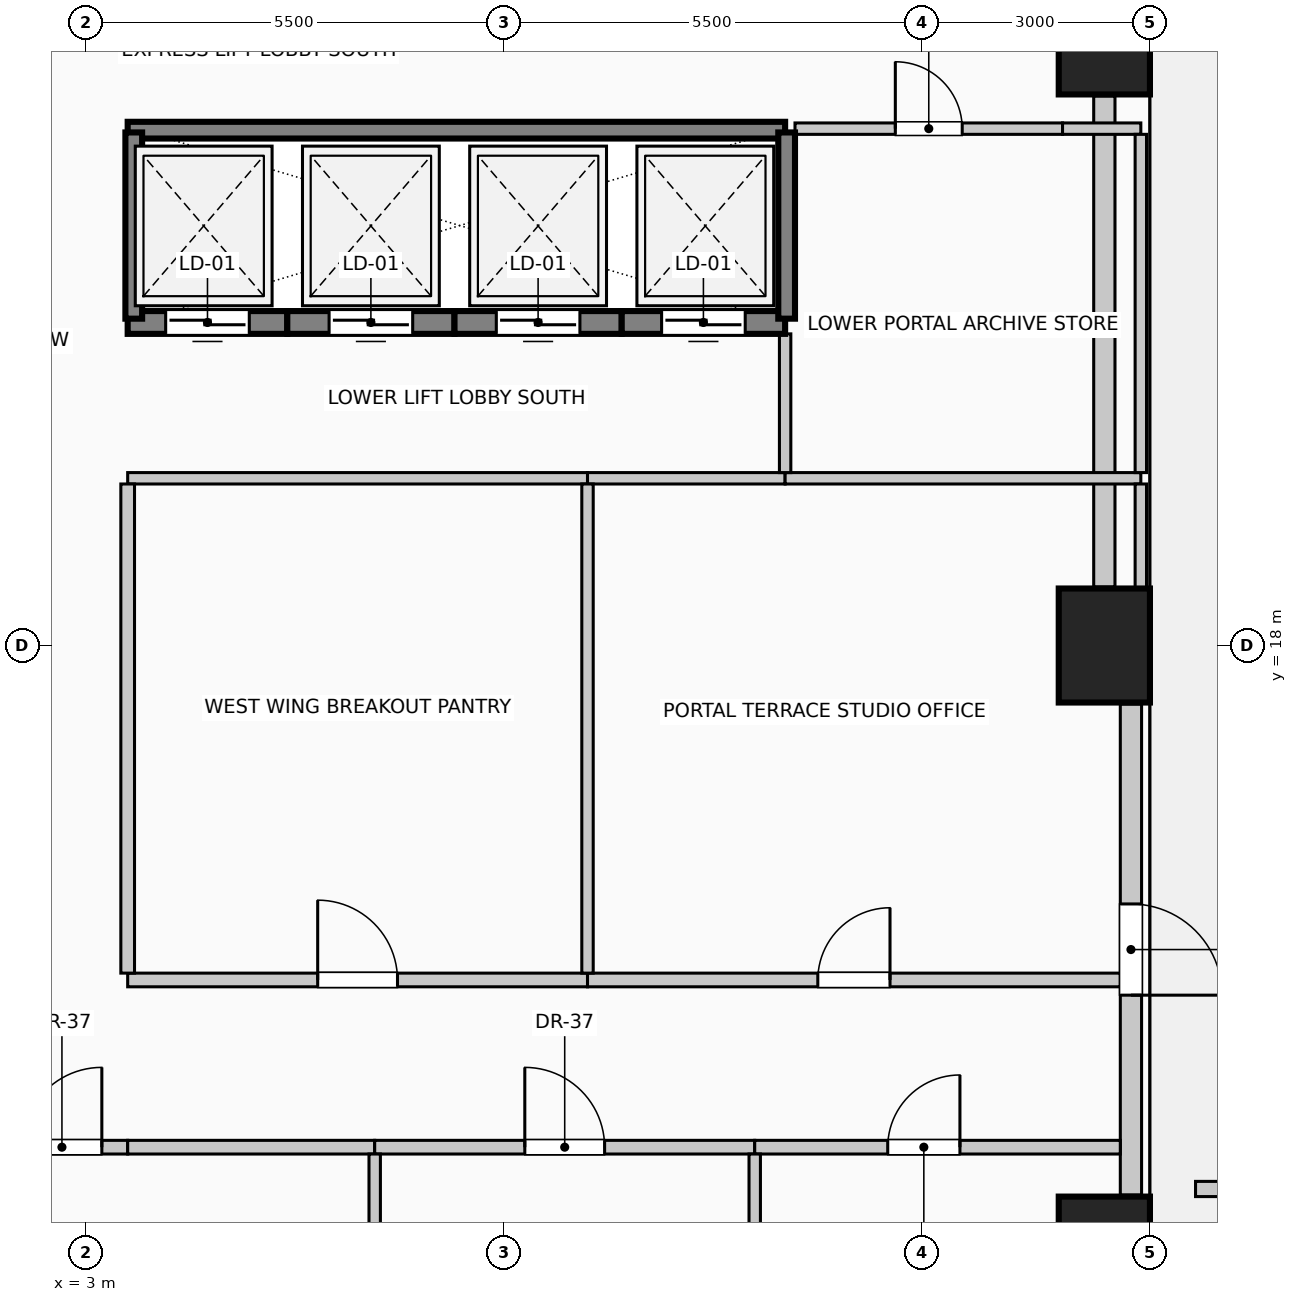
"""IFC4 building model, lengths in metres.
Left out: names, types, materials, properties, quantities, classifications, styles, units other than length and angle.
Written with IfcOpenShell. Run it as: python <this file> out.ifc"""

import sys

from ifc_helpers import new_model, si_unit, direction, frame, frame_2d, origin, origin_2d, place, context, subcontext, project, spatial, rectangle, extrude, element, fill, save


model = new_model("IFC4")
c1 = context("Model", 3, precision=1e-05, world=origin(), true_north=direction((0.0, 1.0)))
c2 = subcontext(c1, "Body", "Model", "MODEL_VIEW")
j1 = project(units=[si_unit("LENGTHUNIT", "METRE"), si_unit("PLANEANGLEUNIT", "RADIAN")], contexts=[c1])
p1 = place(None, origin())
s1 = spatial("IfcSite", under=j1, at=p1, CompositionType="ELEMENT")
p2 = place(p1, origin())
s2 = spatial("IfcBuilding", under=s1, at=p2, CompositionType="ELEMENT")
p3 = place(p2, frame((0.0, 0.0, 30.6)))
s3 = spatial("IfcBuildingStorey", under=s2, at=p3, CompositionType="ELEMENT", Elevation=30.6)
for number, where, z_axis, x_axis in (
    (1, (16.4, 10.0, 0.0), (0.0, 0.0, 1.0), (1.0, 0.0, 0.0)),
    (2, (16.4, 18.0, 0.0), (0.0, 0.0, 1.0), (1.0, 0.0, 0.0)),
    (3, (16.4, 26.0, 0.0), (0.0, 0.0, 1.0), (1.0, 0.0, 0.0)),
):
    element("IfcColumn", number, at=place(p3, frame(where, z_axis=z_axis, x_axis=x_axis)), inside=s3, PredefinedType="COLUMN", context=c2, shape_type="SweptSolid", body=[
        extrude(rectangle(XDim=1.2, YDim=1.5, at=origin_2d()), origin(), (0.0, 0.0, 1.0), 4.0),
    ])
p4 = place(p3, frame((16.75, 17.23, 0.0), z_axis=(0.0, 0.0, 1.0), x_axis=(0.0, -1.0, 0.0)))
e4 = element("IfcWall", 4, at=p4, inside=s3, PredefinedType="SOLIDWALL", context=c2, shape_type="SweptSolid", body=[
    extrude(rectangle(XDim=6.46, YDim=0.28, at=frame_2d((3.23, 0.0))), origin(), (0.0, 0.0, 1.0), 3.7),
])
p5 = place(p4, frame((2.63, 0.0, 0.0)))
e5 = element("IfcOpeningElement", 5, at=p5, cuts=e4, PredefinedType="OPENING", context=c2, shape_type="SweptSolid", body=[
    extrude(rectangle(XDim=1.2, YDim=2.25, at=frame_2d((0.6, 1.125))), frame((0.0, 0.15, 0.0), z_axis=(0.0, -1.0, 0.0), x_axis=(1.0, 0.0, 0.0)), (0.0, 0.0, 1.0), 0.3),
])
p6 = place(p3, frame((16.4, 25.23, 0.0), z_axis=(0.0, 0.0, 1.0), x_axis=(0.0, -1.0, 0.0)))
e6 = element("IfcWall", 6, at=p6, inside=s3, PredefinedType="SOLIDWALL", context=c2, shape_type="SweptSolid", body=[
    extrude(rectangle(XDim=6.46, YDim=0.28, at=frame_2d((3.23, 0.0))), origin(), (0.0, 0.0, 1.0), 3.0),
])
p7 = place(p3, frame((17.6, 10.85, 0.0), z_axis=(0.0, 0.0, 1.0), x_axis=(1.0, 0.0, 0.0)))
e7 = element("IfcWall", 7, at=p7, inside=s3, PredefinedType="USERDEFINED", context=c2, shape_type="SweptSolid", body=[
    extrude(rectangle(XDim=22.8, YDim=0.2, at=frame_2d((11.4, 0.0))), origin(), (0.0, 0.0, 1.0), 0.55),
])
p8 = place(p3, frame((5.65, 22.25, 0.0), z_axis=(0.0, 0.0, 1.0), x_axis=(-1.0, 0.0, 0.0)))
e8 = element("IfcWall", 8, at=p8, inside=s3, PredefinedType="SOLIDWALL", context=c2, shape_type="SweptSolid", body=[
    extrude(rectangle(XDim=2.1, YDim=0.3, at=frame_2d((1.05, 0.0))), origin(), (0.0, 0.0, 1.0), 4.0),
])
p9 = place(p8, frame((0.5, 0.0, 0.0)))
e9 = element("IfcOpeningElement", 9, at=p9, cuts=e8, PredefinedType="OPENING", context=c2, shape_type="SweptSolid", body=[
    extrude(rectangle(XDim=1.1, YDim=2.2, at=frame_2d((0.55, 1.1))), frame((0.0, 0.16, 0.0), z_axis=(0.0, -1.0, 0.0), x_axis=(1.0, 0.0, 0.0)), (0.0, 0.0, 1.0), 0.32),
])
p10 = place(p3, frame((7.85, 22.25, 0.0), z_axis=(0.0, 0.0, 1.0), x_axis=(-1.0, 0.0, 0.0)))
e10 = element("IfcWall", 10, at=p10, inside=s3, PredefinedType="SOLIDWALL", context=c2, shape_type="SweptSolid", body=[
    extrude(rectangle(XDim=2.2, YDim=0.3, at=frame_2d((1.1, 0.0))), origin(), (0.0, 0.0, 1.0), 4.0),
])
p11 = place(p10, frame((0.55, 0.0, 0.0)))
e11 = element("IfcOpeningElement", 11, at=p11, cuts=e10, PredefinedType="OPENING", context=c2, shape_type="SweptSolid", body=[
    extrude(rectangle(XDim=1.1, YDim=2.2, at=frame_2d((0.55, 1.1))), frame((0.0, 0.16, 0.0), z_axis=(0.0, -1.0, 0.0), x_axis=(1.0, 0.0, 0.0)), (0.0, 0.0, 1.0), 0.32),
])
p12 = place(p3, frame((10.05, 22.25, 0.0), z_axis=(0.0, 0.0, 1.0), x_axis=(-1.0, 0.0, 0.0)))
e12 = element("IfcWall", 12, at=p12, inside=s3, PredefinedType="SOLIDWALL", context=c2, shape_type="SweptSolid", body=[
    extrude(rectangle(XDim=2.2, YDim=0.3, at=frame_2d((1.1, 0.0))), origin(), (0.0, 0.0, 1.0), 4.0),
])
p13 = place(p12, frame((0.55, 0.0, 0.0)))
e13 = element("IfcOpeningElement", 13, at=p13, cuts=e12, PredefinedType="OPENING", context=c2, shape_type="SweptSolid", body=[
    extrude(rectangle(XDim=1.1, YDim=2.2, at=frame_2d((0.55, 1.1))), frame((0.0, 0.16, 0.0), z_axis=(0.0, -1.0, 0.0), x_axis=(1.0, 0.0, 0.0)), (0.0, 0.0, 1.0), 0.32),
])
p14 = place(p3, frame((12.2, 22.25, 0.0), z_axis=(0.0, 0.0, 1.0), x_axis=(-1.0, 0.0, 0.0)))
e14 = element("IfcWall", 14, at=p14, inside=s3, PredefinedType="SOLIDWALL", context=c2, shape_type="SweptSolid", body=[
    extrude(rectangle(XDim=2.15, YDim=0.3, at=frame_2d((1.075, 0.0))), origin(), (0.0, 0.0, 1.0), 4.0),
])
p15 = place(p14, frame((0.525, 0.0, 0.0)))
e15 = element("IfcOpeningElement", 15, at=p15, cuts=e14, PredefinedType="OPENING", context=c2, shape_type="SweptSolid", body=[
    extrude(rectangle(XDim=1.1, YDim=2.2, at=frame_2d((0.55, 1.1))), frame((0.0, 0.16, 0.0), z_axis=(0.0, -1.0, 0.0), x_axis=(1.0, 0.0, 0.0)), (0.0, 0.0, 1.0), 0.32),
])
p16 = place(p3, frame((3.55, 24.78, 0.0), z_axis=(0.0, 0.0, 1.0), x_axis=(1.0, 0.0, 0.0)))
e16 = element("IfcWall", 16, at=p16, inside=s3, PredefinedType="SOLIDWALL", context=c2, shape_type="SweptSolid", body=[
    extrude(rectangle(XDim=8.65, YDim=0.22, at=frame_2d((4.325, 0.0))), origin(), (0.0, 0.0, 1.0), 4.0),
])
for number, where, z_axis, x_axis in (
    (17, (3.63, 22.3, 0.0), (0.0, 0.0, 1.0), (0.0, 1.0, 0.0)),
    (18, (12.22, 22.3, 0.0), (0.0, 0.0, 1.0), (0.0, 1.0, 0.0)),
):
    element("IfcWall", number, at=place(p3, frame(where, z_axis=z_axis, x_axis=x_axis)), inside=s3, PredefinedType="SOLIDWALL", context=c2, shape_type="SweptSolid", body=[
        extrude(rectangle(XDim=2.45, YDim=0.22, at=frame_2d((1.225, 0.0))), origin(), (0.0, 0.0, 1.0), 4.0),
    ])
p17 = place(p3, frame((0.74, 11.4, 0.0), z_axis=(0.0, 0.0, 1.0), x_axis=(1.0, 0.0, 0.0)))
e19 = element("IfcWall", 19, at=p17, inside=s3, PredefinedType="PARTITIONING", context=c2, shape_type="SweptSolid", body=[
    extrude(rectangle(XDim=2.81, YDim=0.18, at=frame_2d((1.405, 0.0))), origin(), (0.0, 0.0, 1.0), 3.095),
])
p18 = place(p17, frame((1.42, 0.0, 0.0)))
e20 = element("IfcOpeningElement", 20, at=p18, cuts=e19, PredefinedType="OPENING", context=c2, shape_type="SweptSolid", body=[
    extrude(rectangle(XDim=1.05, YDim=2.15, at=frame_2d((0.525, 1.075))), frame((0.0, 0.1, 0.0), z_axis=(0.0, -1.0, 0.0), x_axis=(1.0, 0.0, 0.0)), (0.0, 0.0, 1.0), 0.2),
])
p19 = place(p3, frame((3.55, 11.4, 0.0), z_axis=(0.0, 0.0, 1.0), x_axis=(1.0, 0.0, 0.0)))
e21 = element("IfcWall", 21, at=p19, inside=s3, PredefinedType="PARTITIONING", context=c2, shape_type="SweptSolid", body=[
    extrude(rectangle(XDim=3.25, YDim=0.18, at=frame_2d((1.625, 0.0))), origin(), (0.0, 0.0, 1.0), 3.095),
])
p20 = place(p3, frame((6.8, 11.4, 0.0), z_axis=(0.0, 0.0, 1.0), x_axis=(1.0, 0.0, 0.0)))
e22 = element("IfcWall", 22, at=p20, inside=s3, PredefinedType="PARTITIONING", context=c2, shape_type="SweptSolid", body=[
    extrude(rectangle(XDim=5.0, YDim=0.18, at=frame_2d((2.5, 0.0))), origin(), (0.0, 0.0, 1.0), 3.095),
])
p21 = place(p20, frame((1.975, 0.0, 0.0)))
e23 = element("IfcOpeningElement", 23, at=p21, cuts=e22, PredefinedType="OPENING", context=c2, shape_type="SweptSolid", body=[
    extrude(rectangle(XDim=1.05, YDim=2.15, at=frame_2d((0.525, 1.075))), frame((0.0, 0.1, 0.0), z_axis=(0.0, -1.0, 0.0), x_axis=(1.0, 0.0, 0.0)), (0.0, 0.0, 1.0), 0.2),
])
p22 = place(p3, frame((11.8, 11.4, 0.0), z_axis=(0.0, 0.0, 1.0), x_axis=(1.0, 0.0, 0.0)))
e24 = element("IfcWall", 24, at=p22, inside=s3, PredefinedType="PARTITIONING", context=c2, shape_type="SweptSolid", body=[
    extrude(rectangle(XDim=4.81, YDim=0.18, at=frame_2d((2.405, 0.0))), origin(), (0.0, 0.0, 1.0), 3.095),
])
p23 = place(p22, frame((1.75, 0.0, 0.0)))
e25 = element("IfcOpeningElement", 25, at=p23, cuts=e24, PredefinedType="OPENING", context=c2, shape_type="SweptSolid", body=[
    extrude(rectangle(XDim=0.95, YDim=2.15, at=frame_2d((0.475, 1.075))), frame((0.0, 0.1, 0.0), z_axis=(0.0, -1.0, 0.0), x_axis=(1.0, 0.0, 0.0)), (0.0, 0.0, 1.0), 0.2),
])
p24 = place(p3, frame((3.55, 13.6, 0.0), z_axis=(0.0, 0.0, 1.0), x_axis=(1.0, 0.0, 0.0)))
e26 = element("IfcWall", 26, at=p24, inside=s3, PredefinedType="PARTITIONING", context=c2, shape_type="SweptSolid", body=[
    extrude(rectangle(XDim=6.05, YDim=0.18, at=frame_2d((3.025, 0.0))), origin(), (0.0, 0.0, 1.0), 3.7),
])
p25 = place(p24, frame((2.5, 0.0, 0.0)))
e27 = element("IfcOpeningElement", 27, at=p25, cuts=e26, PredefinedType="OPENING", context=c2, shape_type="SweptSolid", body=[
    extrude(rectangle(XDim=1.05, YDim=2.15, at=frame_2d((0.525, 1.075))), frame((0.0, 0.1, 0.0), z_axis=(0.0, -1.0, 0.0), x_axis=(1.0, 0.0, 0.0)), (0.0, 0.0, 1.0), 0.2),
])
p26 = place(p3, frame((9.6, 13.6, 0.0), z_axis=(0.0, 0.0, 1.0), x_axis=(1.0, 0.0, 0.0)))
e28 = element("IfcWall", 28, at=p26, inside=s3, PredefinedType="PARTITIONING", context=c2, shape_type="SweptSolid", body=[
    extrude(rectangle(XDim=7.01, YDim=0.18, at=frame_2d((3.505, 0.0))), origin(), (0.0, 0.0, 1.0), 3.7),
])
p27 = place(p26, frame((3.03, 0.0, 0.0)))
e29 = element("IfcOpeningElement", 29, at=p27, cuts=e28, PredefinedType="OPENING", context=c2, shape_type="SweptSolid", body=[
    extrude(rectangle(XDim=0.95, YDim=2.15, at=frame_2d((0.475, 1.075))), frame((0.0, 0.1, 0.0), z_axis=(0.0, -1.0, 0.0), x_axis=(1.0, 0.0, 0.0)), (0.0, 0.0, 1.0), 0.2),
])
p28 = place(p3, frame((3.55, 20.2, 0.0), z_axis=(0.0, 0.0, 1.0), x_axis=(1.0, 0.0, 0.0)))
e30 = element("IfcWall", 30, at=p28, inside=s3, PredefinedType="PARTITIONING", context=c2, shape_type="SweptSolid", body=[
    extrude(rectangle(XDim=6.05, YDim=0.15, at=frame_2d((3.025, 0.0))), origin(), (0.0, 0.0, 1.0), 3.7),
])
p29 = place(p3, frame((9.6, 20.2, 0.0), z_axis=(0.0, 0.0, 1.0), x_axis=(1.0, 0.0, 0.0)))
e31 = element("IfcWall", 31, at=p29, inside=s3, PredefinedType="PARTITIONING", context=c2, shape_type="SweptSolid", body=[
    extrude(rectangle(XDim=2.6, YDim=0.15, at=frame_2d((1.3, 0.0))), origin(), (0.0, 0.0, 1.0), 3.7),
])
p30 = place(p3, frame((12.2, 20.2, 0.0), z_axis=(0.0, 0.0, 1.0), x_axis=(1.0, 0.0, 0.0)))
e32 = element("IfcWall", 32, at=p30, inside=s3, PredefinedType="PARTITIONING", context=c2, shape_type="SweptSolid", body=[
    extrude(rectangle(XDim=4.68, YDim=0.15, at=frame_2d((2.34, 0.0))), origin(), (0.0, 0.0, 1.0), 3.7),
])
p31 = place(p3, frame((12.33, 24.8, 0.0), z_axis=(0.0, 0.0, 1.0), x_axis=(1.0, 0.0, 0.0)))
e33 = element("IfcWall", 33, at=p31, inside=s3, PredefinedType="PARTITIONING", context=c2, shape_type="SweptSolid", body=[
    extrude(rectangle(XDim=3.52, YDim=0.15, at=frame_2d((1.76, 0.0))), origin(), (0.0, 0.0, 1.0), 3.7),
])
p32 = place(p31, frame((1.32, 0.0, 0.0)))
e34 = element("IfcOpeningElement", 34, at=p32, cuts=e33, PredefinedType="OPENING", context=c2, shape_type="SweptSolid", body=[
    extrude(rectangle(XDim=0.88, YDim=2.1, at=frame_2d((0.44, 1.05))), frame((0.0, 0.085, 0.0), z_axis=(0.0, -1.0, 0.0), x_axis=(1.0, 0.0, 0.0)), (0.0, 0.0, 1.0), 0.17),
])
p33 = place(p3, frame((15.85, 24.8, 0.0), z_axis=(0.0, 0.0, 1.0), x_axis=(1.0, 0.0, 0.0)))
e35 = element("IfcWall", 35, at=p33, inside=s3, PredefinedType="PARTITIONING", context=c2, shape_type="SweptSolid", body=[
    extrude(rectangle(XDim=1.03, YDim=0.15, at=frame_2d((0.515, 0.0))), origin(), (0.0, 0.0, 1.0), 3.7),
])
p34 = place(p3, frame((3.55, 13.69, 0.0), z_axis=(0.0, 0.0, 1.0), x_axis=(0.0, 1.0, 0.0)))
e36 = element("IfcWall", 36, at=p34, inside=s3, PredefinedType="PARTITIONING", context=c2, shape_type="SweptSolid", body=[
    extrude(rectangle(XDim=6.435, YDim=0.18, at=frame_2d((3.218, 0.0))), origin(), (0.0, 0.0, 1.0), 3.7),
])
p35 = place(p3, frame((6.8, 0.74, 0.0), z_axis=(0.0, 0.0, 1.0), x_axis=(0.0, 1.0, 0.0)))
e37 = element("IfcWall", 37, at=p35, inside=s3, PredefinedType="PARTITIONING", context=c2, shape_type="SweptSolid", body=[
    extrude(rectangle(XDim=10.57, YDim=0.15, at=frame_2d((5.285, 0.0))), origin(), (0.0, 0.0, 1.0), 3.7),
])
p36 = place(p3, frame((9.6, 13.69, 0.0), z_axis=(0.0, 0.0, 1.0), x_axis=(0.0, 1.0, 0.0)))
e38 = element("IfcWall", 38, at=p36, inside=s3, PredefinedType="PARTITIONING", context=c2, shape_type="SweptSolid", body=[
    extrude(rectangle(XDim=6.435, YDim=0.15, at=frame_2d((3.218, 0.0))), origin(), (0.0, 0.0, 1.0), 3.7),
])
p37 = place(p3, frame((11.8, 0.74, 0.0), z_axis=(0.0, 0.0, 1.0), x_axis=(0.0, 1.0, 0.0)))
e39 = element("IfcWall", 39, at=p37, inside=s3, PredefinedType="PARTITIONING", context=c2, shape_type="SweptSolid", body=[
    extrude(rectangle(XDim=10.57, YDim=0.15, at=frame_2d((5.285, 0.0))), origin(), (0.0, 0.0, 1.0), 3.7),
])
p38 = place(p3, frame((12.2, 20.275, 0.0), z_axis=(0.0, 0.0, 1.0), x_axis=(0.0, 1.0, 0.0)))
e40 = element("IfcWall", 40, at=p38, inside=s3, PredefinedType="PARTITIONING", context=c2, shape_type="SweptSolid", body=[
    extrude(rectangle(XDim=1.825, YDim=0.15, at=frame_2d((0.913, 0.0))), origin(), (0.0, 0.0, 1.0), 3.7),
])
p39 = place(p3, frame((16.88, 18.75, 0.0), z_axis=(0.0, 0.0, 1.0), x_axis=(0.0, 1.0, 0.0)))
e41 = element("IfcWall", 41, at=p39, inside=s3, PredefinedType="PARTITIONING", context=c2, shape_type="SweptSolid", body=[
    extrude(rectangle(XDim=1.375, YDim=0.15, at=frame_2d((0.688, 0.0))), origin(), (0.0, 0.0, 1.0), 3.7),
])
p40 = place(p3, frame((16.88, 20.275, 0.0), z_axis=(0.0, 0.0, 1.0), x_axis=(0.0, 1.0, 0.0)))
e42 = element("IfcWall", 42, at=p40, inside=s3, PredefinedType="PARTITIONING", context=c2, shape_type="SweptSolid", body=[
    extrude(rectangle(XDim=4.45, YDim=0.15, at=frame_2d((2.225, 0.0))), origin(), (0.0, 0.0, 1.0), 3.7),
])
p41 = place(p5, origin())
e43 = element("IfcDoor", 43, at=p41, inside=s3, OperationType="SINGLE_SWING_RIGHT", PredefinedType="DOOR", context=c2, shape_type="SweptSolid", body=[
    extrude(rectangle(XDim=1.2, YDim=2.25, at=frame_2d((0.6, 1.125))), frame((0.0, 0.025, 0.0), z_axis=(0.0, -1.0, 0.0), x_axis=(1.0, 0.0, 0.0)), (0.0, 0.0, 1.0), 0.05),
])
fill(e5, e43)
p42 = place(p9, origin())
e44 = element("IfcDoor", 44, at=p42, inside=s3, OperationType="SLIDING_TO_LEFT", PredefinedType="DOOR", context=c2, shape_type="SweptSolid", body=[
    extrude(rectangle(XDim=1.1, YDim=2.2, at=frame_2d((0.55, 1.1))), frame((0.0, 0.025, 0.0), z_axis=(0.0, -1.0, 0.0), x_axis=(1.0, 0.0, 0.0)), (0.0, 0.0, 1.0), 0.05),
])
fill(e9, e44)
p43 = place(p11, origin())
e45 = element("IfcDoor", 45, at=p43, inside=s3, OperationType="SLIDING_TO_RIGHT", PredefinedType="DOOR", context=c2, shape_type="SweptSolid", body=[
    extrude(rectangle(XDim=1.1, YDim=2.2, at=frame_2d((0.55, 1.1))), frame((0.0, 0.025, 0.0), z_axis=(0.0, -1.0, 0.0), x_axis=(1.0, 0.0, 0.0)), (0.0, 0.0, 1.0), 0.05),
])
fill(e11, e45)
p44 = place(p13, origin())
e46 = element("IfcDoor", 46, at=p44, inside=s3, OperationType="SLIDING_TO_LEFT", PredefinedType="DOOR", context=c2, shape_type="SweptSolid", body=[
    extrude(rectangle(XDim=1.1, YDim=2.2, at=frame_2d((0.55, 1.1))), frame((0.0, 0.025, 0.0), z_axis=(0.0, -1.0, 0.0), x_axis=(1.0, 0.0, 0.0)), (0.0, 0.0, 1.0), 0.05),
])
fill(e13, e46)
p45 = place(p15, origin())
e47 = element("IfcDoor", 47, at=p45, inside=s3, OperationType="SLIDING_TO_RIGHT", PredefinedType="DOOR", context=c2, shape_type="SweptSolid", body=[
    extrude(rectangle(XDim=1.1, YDim=2.2, at=frame_2d((0.55, 1.1))), frame((0.0, 0.025, 0.0), z_axis=(0.0, -1.0, 0.0), x_axis=(1.0, 0.0, 0.0)), (0.0, 0.0, 1.0), 0.05),
])
fill(e15, e47)
p46 = place(p18, origin())
e48 = element("IfcDoor", 48, at=p46, inside=s3, OperationType="SINGLE_SWING_RIGHT", PredefinedType="DOOR", context=c2, shape_type="SweptSolid", body=[
    extrude(rectangle(XDim=1.05, YDim=2.15, at=frame_2d((0.525, 1.075))), frame((0.0, 0.025, 0.0), z_axis=(0.0, -1.0, 0.0), x_axis=(1.0, 0.0, 0.0)), (0.0, 0.0, 1.0), 0.05),
])
fill(e20, e48)
p47 = place(p21, origin())
e49 = element("IfcDoor", 49, at=p47, inside=s3, OperationType="SINGLE_SWING_LEFT", PredefinedType="DOOR", context=c2, shape_type="SweptSolid", body=[
    extrude(rectangle(XDim=1.05, YDim=2.15, at=frame_2d((0.525, 1.075))), frame((0.0, 0.025, 0.0), z_axis=(0.0, -1.0, 0.0), x_axis=(1.0, 0.0, 0.0)), (0.0, 0.0, 1.0), 0.05),
])
fill(e23, e49)
p48 = place(p23, origin())
e50 = element("IfcDoor", 50, at=p48, inside=s3, OperationType="SINGLE_SWING_RIGHT", PredefinedType="DOOR", context=c2, shape_type="SweptSolid", body=[
    extrude(rectangle(XDim=0.95, YDim=2.15, at=frame_2d((0.475, 1.075))), frame((0.0, 0.025, 0.0), z_axis=(0.0, -1.0, 0.0), x_axis=(1.0, 0.0, 0.0)), (0.0, 0.0, 1.0), 0.05),
])
fill(e25, e50)
p49 = place(p25, origin())
e51 = element("IfcDoor", 51, at=p49, inside=s3, OperationType="SINGLE_SWING_LEFT", PredefinedType="DOOR", context=c2, shape_type="SweptSolid", body=[
    extrude(rectangle(XDim=1.05, YDim=2.15, at=frame_2d((0.525, 1.075))), frame((0.0, 0.025, 0.0), z_axis=(0.0, -1.0, 0.0), x_axis=(1.0, 0.0, 0.0)), (0.0, 0.0, 1.0), 0.05),
])
fill(e27, e51)
p50 = place(p27, origin())
e52 = element("IfcDoor", 52, at=p50, inside=s3, OperationType="SINGLE_SWING_RIGHT", PredefinedType="DOOR", context=c2, shape_type="SweptSolid", body=[
    extrude(rectangle(XDim=0.95, YDim=2.15, at=frame_2d((0.475, 1.075))), frame((0.0, 0.025, 0.0), z_axis=(0.0, -1.0, 0.0), x_axis=(1.0, 0.0, 0.0)), (0.0, 0.0, 1.0), 0.05),
])
fill(e29, e52)
p51 = place(p32, origin())
e53 = element("IfcDoor", 53, at=p51, inside=s3, OperationType="SINGLE_SWING_LEFT", PredefinedType="DOOR", context=c2, shape_type="SweptSolid", body=[
    extrude(rectangle(XDim=0.88, YDim=2.1, at=frame_2d((0.44, 1.05))), frame((0.0, 0.025, 0.0), z_axis=(0.0, -1.0, 0.0), x_axis=(1.0, 0.0, 0.0)), (0.0, 0.0, 1.0), 0.05),
])
fill(e34, e53)
save(model, sys.argv[1])
